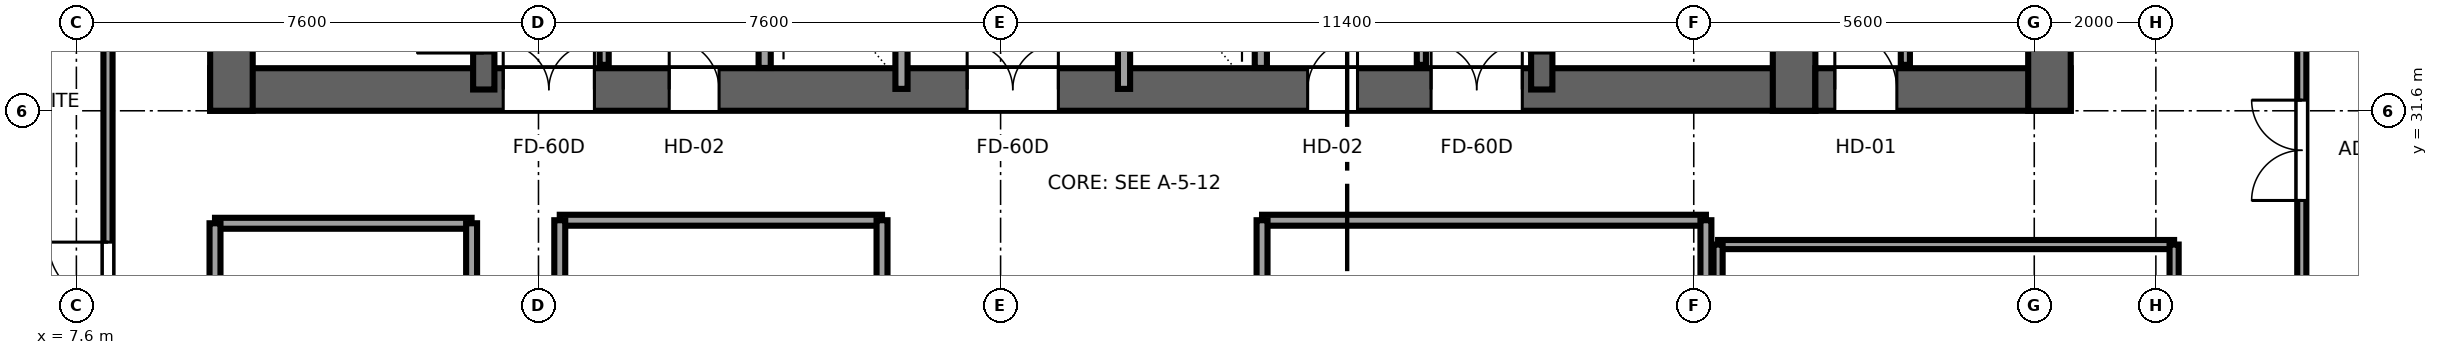
"""IFC4 building model, lengths in metres.
Left out: names, types, materials, properties, quantities, classifications, styles, units other than length and angle.
Written with IfcOpenShell. Run it as: python <this file> out.ifc"""

import sys

from ifc_helpers import new_model, si_unit, direction, frame, frame_2d, origin, place, context, subcontext, project, spatial, rectangle, extrude, source, transform, mapped, element, fill, save


model = new_model("IFC4")
c1 = context("Model", 3, precision=1e-05, world=origin(), true_north=direction((0.0, 1.0)))
c2 = subcontext(c1, "Body", "Model", "MODEL_VIEW")
j1 = project(units=[si_unit("LENGTHUNIT", "METRE"), si_unit("PLANEANGLEUNIT", "RADIAN")], contexts=[c1])
p1 = place(None, origin())
s1 = spatial("IfcSite", under=j1, at=p1, CompositionType="ELEMENT")
p2 = place(p1, origin())
s2 = spatial("IfcBuilding", under=s1, at=p2, CompositionType="ELEMENT")
p3 = place(p2, frame((0.0, 0.0, 157.7)))
s3 = spatial("IfcBuildingStorey", under=s2, at=p3, CompositionType="ELEMENT", Elevation=157.7)
p4 = place(p3, frame((9.8, 31.95, 0.0), z_axis=(0.0, 0.0, 1.0), x_axis=(1.0, 0.0, 0.0)))
e1 = element("IfcWall", 1, at=p4, inside=s3, PredefinedType="SHEAR", context=c2, shape_type="SweptSolid", body=[
    extrude(rectangle(XDim=26.4, YDim=0.7, at=frame_2d((13.2, 0.0))), origin(), (0.0, 0.0, 1.0), 3.55),
])
p5 = place(p4, frame((6.32, 0.0, 0.0), z_axis=(0.0, 0.0, 1.0), x_axis=(-1.0, 0.0, 0.0)))
e2 = element("IfcOpeningElement", 2, at=p5, cuts=e1, PredefinedType="OPENING", context=c2, shape_type="SweptSolid", body=[
    extrude(rectangle(XDim=1.5, YDim=2.04, at=frame_2d((0.75, 1.02))), frame((0.0, 0.36, 0.0), z_axis=(0.0, -1.0, 0.0), x_axis=(1.0, 0.0, 0.0)), (0.0, 0.0, 1.0), 0.72),
])
p6 = place(p4, frame((13.95, 0.0, 0.0), z_axis=(0.0, 0.0, 1.0), x_axis=(-1.0, 0.0, 0.0)))
e3 = element("IfcOpeningElement", 3, at=p6, cuts=e1, PredefinedType="OPENING", context=c2, shape_type="SweptSolid", body=[
    extrude(rectangle(XDim=1.5, YDim=2.04, at=frame_2d((0.75, 1.02))), frame((0.0, 0.36, 0.0), z_axis=(0.0, -1.0, 0.0), x_axis=(1.0, 0.0, 0.0)), (0.0, 0.0, 1.0), 0.72),
])
p7 = place(p4, frame((21.58, 0.0, 0.0), z_axis=(0.0, 0.0, 1.0), x_axis=(-1.0, 0.0, 0.0)))
e4 = element("IfcOpeningElement", 4, at=p7, cuts=e1, PredefinedType="OPENING", context=c2, shape_type="SweptSolid", body=[
    extrude(rectangle(XDim=1.5, YDim=2.04, at=frame_2d((0.75, 1.02))), frame((0.0, 0.36, 0.0), z_axis=(0.0, -1.0, 0.0), x_axis=(1.0, 0.0, 0.0)), (0.0, 0.0, 1.0), 0.72),
])
p8 = place(p4, frame((8.37, 0.0, 0.0), z_axis=(0.0, 0.0, 1.0), x_axis=(-1.0, 0.0, 0.0)))
e5 = element("IfcOpeningElement", 5, at=p8, cuts=e1, PredefinedType="OPENING", context=c2, shape_type="SweptSolid", body=[
    extrude(rectangle(XDim=0.82, YDim=2.01, at=frame_2d((0.41, 1.005))), frame((0.0, 0.36, 0.0), z_axis=(0.0, -1.0, 0.0), x_axis=(1.0, 0.0, 0.0)), (0.0, 0.0, 1.0), 0.72),
])
p9 = place(p4, frame((18.87, 0.0, 0.0), z_axis=(0.0, 0.0, 1.0), x_axis=(-1.0, 0.0, 0.0)))
e6 = element("IfcOpeningElement", 6, at=p9, cuts=e1, PredefinedType="OPENING", context=c2, shape_type="SweptSolid", body=[
    extrude(rectangle(XDim=0.82, YDim=2.01, at=frame_2d((0.41, 1.005))), frame((0.0, 0.36, 0.0), z_axis=(0.0, -1.0, 0.0), x_axis=(1.0, 0.0, 0.0)), (0.0, 0.0, 1.0), 0.72),
])
for number, where, z_axis, x_axis in (
    (7, (10.15, 31.6, 0.0), (0.0, 0.0, 1.0), (0.0, 1.0, 0.0)),
    (8, (35.85, 31.6, 0.0), (0.0, 0.0, 1.0), (0.0, 1.0, 0.0)),
):
    element("IfcWall", number, at=place(p3, frame(where, z_axis=z_axis, x_axis=x_axis)), inside=s3, PredefinedType="SHEAR", context=c2, shape_type="SweptSolid", body=[
        extrude(rectangle(XDim=13.6, YDim=0.7, at=frame_2d((6.8, 0.0))), origin(), (0.0, 0.0, 1.0), 3.55),
    ])
p10 = place(p3, frame((14.3, 31.95, 0.0), z_axis=(0.0, 0.0, 1.0), x_axis=(0.0, 1.0, 0.0)))
e9 = element("IfcWall", 9, at=p10, inside=s3, PredefinedType="SHEAR", context=c2, shape_type="SweptSolid", body=[
    extrude(rectangle(XDim=12.9, YDim=0.35, at=frame_2d((6.45, 0.0))), origin(), (0.0, 0.0, 1.0), 3.55),
])
p11 = place(p10, frame((0.6, 0.0, 0.0)))
e10 = element("IfcOpeningElement", 10, at=p11, cuts=e9, PredefinedType="OPENING", context=c2, shape_type="SweptSolid", body=[
    extrude(rectangle(XDim=1.1, YDim=2.12, at=frame_2d((0.55, 1.06))), frame((0.0, 0.185, 0.0), z_axis=(0.0, -1.0, 0.0), x_axis=(1.0, 0.0, 0.0)), (0.0, 0.0, 1.0), 0.37),
])
p12 = place(p3, frame((31.7, 31.95, 0.0), z_axis=(0.0, 0.0, 1.0), x_axis=(0.0, 1.0, 0.0)))
e11 = element("IfcWall", 11, at=p12, inside=s3, PredefinedType="SHEAR", context=c2, shape_type="SweptSolid", body=[
    extrude(rectangle(XDim=12.9, YDim=0.35, at=frame_2d((6.45, 0.0))), origin(), (0.0, 0.0, 1.0), 3.55),
])
p13 = place(p12, frame((1.7, 0.0, 0.0), z_axis=(0.0, 0.0, 1.0), x_axis=(-1.0, 0.0, 0.0)))
e12 = element("IfcOpeningElement", 12, at=p13, cuts=e11, PredefinedType="OPENING", context=c2, shape_type="SweptSolid", body=[
    extrude(rectangle(XDim=1.1, YDim=2.12, at=frame_2d((0.55, 1.06))), frame((0.0, 0.185, 0.0), z_axis=(0.0, -1.0, 0.0), x_axis=(1.0, 0.0, 0.0)), (0.0, 0.0, 1.0), 0.37),
])
p14 = place(p3, frame((36.2, 31.95, 0.0), z_axis=(0.0, 0.0, 1.0), x_axis=(1.0, 0.0, 0.0)))
e13 = element("IfcWall", 13, at=p14, inside=s3, PredefinedType="SHEAR", context=c2, shape_type="SweptSolid", body=[
    extrude(rectangle(XDim=4.2, YDim=0.7, at=frame_2d((2.1, 0.0))), origin(), (0.0, 0.0, 1.0), 3.55),
])
p15 = place(p14, frame((1.34, 0.0, 0.0), z_axis=(0.0, 0.0, 1.0), x_axis=(-1.0, 0.0, 0.0)))
e14 = element("IfcOpeningElement", 14, at=p15, cuts=e13, PredefinedType="OPENING", context=c2, shape_type="SweptSolid", body=[
    extrude(rectangle(XDim=1.02, YDim=2.03, at=frame_2d((0.51, 1.015))), frame((0.0, 0.36, 0.0), z_axis=(0.0, -1.0, 0.0), x_axis=(1.0, 0.0, 0.0)), (0.0, 0.0, 1.0), 0.72),
])
p16 = place(p3, frame((40.05, 31.6, 0.0), z_axis=(0.0, 0.0, 1.0), x_axis=(0.0, 1.0, 0.0)))
e15 = element("IfcWall", 15, at=p16, inside=s3, PredefinedType="SHEAR", context=c2, shape_type="SweptSolid", body=[
    extrude(rectangle(XDim=13.6, YDim=0.7, at=frame_2d((6.8, 0.0))), origin(), (0.0, 0.0, 1.0), 3.55),
])
for number, where, z_axis, x_axis in (
    (16, (18.92, 32.304, 0.0), (0.0, 0.0, 1.0), (0.0, 1.0, 0.0)),
    (17, (27.08, 32.304, 0.0), (0.0, 0.0, 1.0), (0.0, 1.0, 0.0)),
):
    element("IfcWall", number, at=place(p3, frame(where, z_axis=z_axis, x_axis=x_axis)), inside=s3, PredefinedType="SOLIDWALL", context=c2, shape_type="SweptSolid", body=[
        extrude(rectangle(XDim=3.846, YDim=0.2, at=frame_2d((1.923, 0.0))), origin(), (0.0, 0.0, 1.0), 3.37),
    ])
p17 = place(p3, frame((21.17, 31.96, 0.0), z_axis=(0.0, 0.0, 1.0), x_axis=(0.0, 1.0, 0.0)))
e18 = element("IfcWall", 18, at=p17, inside=s3, PredefinedType="SOLIDWALL", context=c2, shape_type="SweptSolid", body=[
    extrude(rectangle(XDim=12.58, YDim=0.2, at=frame_2d((6.29, 0.0))), origin(), (0.0, 0.0, 1.0), 3.37),
])
p18 = place(p17, frame((5.74, 0.0, 0.0)))
e19 = element("IfcOpeningElement", 19, at=p18, cuts=e18, PredefinedType="OPENING", context=c2, shape_type="SweptSolid", body=[
    extrude(rectangle(XDim=1.1, YDim=2.12, at=frame_2d((0.55, 1.06))), frame((0.0, 0.11, 0.0), z_axis=(0.0, -1.0, 0.0), x_axis=(1.0, 0.0, 0.0)), (0.0, 0.0, 1.0), 0.22),
])
p19 = place(p17, frame((8.24, 0.0, 0.0)))
e20 = element("IfcOpeningElement", 20, at=p19, cuts=e18, PredefinedType="OPENING", context=c2, shape_type="SweptSolid", body=[
    extrude(rectangle(XDim=1.1, YDim=2.12, at=frame_2d((0.55, 1.06))), frame((0.0, 0.11, 0.0), z_axis=(0.0, -1.0, 0.0), x_axis=(1.0, 0.0, 0.0)), (0.0, 0.0, 1.0), 0.22),
])
p20 = place(p3, frame((24.83, 31.96, 0.0), z_axis=(0.0, 0.0, 1.0), x_axis=(0.0, 1.0, 0.0)))
e21 = element("IfcWall", 21, at=p20, inside=s3, PredefinedType="SOLIDWALL", context=c2, shape_type="SweptSolid", body=[
    extrude(rectangle(XDim=12.58, YDim=0.2, at=frame_2d((6.29, 0.0))), origin(), (0.0, 0.0, 1.0), 3.37),
])
p21 = place(p20, frame((5.74, 0.0, 0.0)))
e22 = element("IfcOpeningElement", 22, at=p21, cuts=e21, PredefinedType="OPENING", context=c2, shape_type="SweptSolid", body=[
    extrude(rectangle(XDim=1.1, YDim=2.12, at=frame_2d((0.55, 1.06))), frame((0.0, 0.11, 0.0), z_axis=(0.0, -1.0, 0.0), x_axis=(1.0, 0.0, 0.0)), (0.0, 0.0, 1.0), 0.22),
])
p22 = place(p20, frame((8.24, 0.0, 0.0)))
e23 = element("IfcOpeningElement", 23, at=p22, cuts=e21, PredefinedType="OPENING", context=c2, shape_type="SweptSolid", body=[
    extrude(rectangle(XDim=1.1, YDim=2.12, at=frame_2d((0.55, 1.06))), frame((0.0, 0.11, 0.0), z_axis=(0.0, -1.0, 0.0), x_axis=(1.0, 0.0, 0.0)), (0.0, 0.0, 1.0), 0.22),
])
for number, where, z_axis, x_axis in (
    (24, (16.28, 32.355, 0.0), (0.0, 0.0, 1.0), (0.0, 1.0, 0.0)),
    (25, (29.72, 32.355, 0.0), (0.0, 0.0, 1.0), (0.0, 1.0, 0.0)),
):
    element("IfcWall", number, at=place(p3, frame(where, z_axis=z_axis, x_axis=x_axis)), inside=s3, PredefinedType="PARTITIONING", context=c2, shape_type="SweptSolid", body=[
        extrude(rectangle(XDim=0.865, YDim=0.15, at=frame_2d((0.433, 0.0))), origin(), (0.0, 0.0, 1.0), 3.37),
    ])
p23 = place(p3, frame((37.68, 32.355, 0.0), z_axis=(0.0, 0.0, 1.0), x_axis=(0.0, 1.0, 0.0)))
e26 = element("IfcWall", 26, at=p23, inside=s3, PredefinedType="PARTITIONING", context=c2, shape_type="SweptSolid", body=[
    extrude(rectangle(XDim=7.845, YDim=0.15, at=frame_2d((3.922, 0.0))), origin(), (0.0, 0.0, 1.0), 3.37),
])
p24 = place(p23, frame((3.413, 0.0, 0.0)))
e27 = element("IfcOpeningElement", 27, at=p24, cuts=e26, PredefinedType="OPENING", context=c2, shape_type="SweptSolid", body=[
    extrude(rectangle(XDim=1.02, YDim=2.03, at=frame_2d((0.51, 1.015))), frame((0.0, 0.085, 0.0), z_axis=(0.0, -1.0, 0.0), x_axis=(1.0, 0.0, 0.0)), (0.0, 0.0, 1.0), 0.17),
])
p25 = place(p3, frame((8.12, 23.58, 0.0), z_axis=(0.0, 0.0, 1.0), x_axis=(0.0, 1.0, 0.0)))
e28 = element("IfcWall", 28, at=p25, inside=s3, PredefinedType="PARTITIONING", context=c2, shape_type="SweptSolid", body=[
    extrude(rectangle(XDim=10.74, YDim=0.15, at=frame_2d((5.37, 0.0))), origin(), (0.0, 0.0, 1.0), 3.37),
])
p26 = place(p25, frame((4.88, 0.0, 0.0)))
e29 = element("IfcOpeningElement", 29, at=p26, cuts=e28, PredefinedType="OPENING", context=c2, shape_type="SweptSolid", body=[
    extrude(rectangle(XDim=0.98, YDim=2.12, at=frame_2d((0.49, 1.06))), frame((0.0, 0.085, 0.0), z_axis=(0.0, -1.0, 0.0), x_axis=(1.0, 0.0, 0.0)), (0.0, 0.0, 1.0), 0.17),
])
p27 = place(p3, frame((44.2, 27.3, 0.0), z_axis=(0.0, 0.0, 1.0), x_axis=(0.0, 1.0, 0.0)))
e30 = element("IfcWall", 30, at=p27, inside=s3, PredefinedType="PARTITIONING", context=c2, shape_type="SweptSolid", body=[
    extrude(rectangle(XDim=7.3, YDim=0.15, at=frame_2d((3.65, 0.0))), origin(), (0.0, 0.0, 1.0), 3.37),
])
p28 = place(p27, frame((2.825, 0.0, 0.0)))
e31 = element("IfcOpeningElement", 31, at=p28, cuts=e30, PredefinedType="OPENING", context=c2, shape_type="SweptSolid", body=[
    extrude(rectangle(XDim=1.65, YDim=2.15, at=frame_2d((0.825, 1.075))), frame((0.0, 0.085, 0.0), z_axis=(0.0, -1.0, 0.0), x_axis=(1.0, 0.0, 0.0)), (0.0, 0.0, 1.0), 0.17),
])
p29 = place(p3, frame((9.88, 29.75, 0.0), z_axis=(0.0, 0.0, 1.0), x_axis=(1.0, 0.0, 0.0)))
e32 = element("IfcWall", 32, at=p29, inside=s3, PredefinedType="PARTITIONING", context=c2, shape_type="SweptSolid", body=[
    extrude(rectangle(XDim=4.22, YDim=0.18, at=frame_2d((2.11, 0.0))), origin(), (0.0, 0.0, 1.0), 3.37),
])
for number, where, z_axis, x_axis in (
    (33, (9.88, 23.5, 0.0), (0.0, 0.0, 1.0), (0.0, 1.0, 0.0)),
    (34, (14.1, 23.5, 0.0), (0.0, 0.0, 1.0), (0.0, 1.0, 0.0)),
):
    element("IfcWall", number, at=place(p3, frame(where, z_axis=z_axis, x_axis=x_axis)), inside=s3, PredefinedType="PARTITIONING", context=c2, shape_type="SweptSolid", body=[
        extrude(rectangle(XDim=6.25, YDim=0.18, at=frame_2d((3.125, 0.0))), origin(), (0.0, 0.0, 1.0), 3.37),
    ])
p30 = place(p3, frame((27.1, 29.8, 0.0), z_axis=(0.0, 0.0, 1.0), x_axis=(1.0, 0.0, 0.0)))
e35 = element("IfcWall", 35, at=p30, inside=s3, PredefinedType="PARTITIONING", context=c2, shape_type="SweptSolid", body=[
    extrude(rectangle(XDim=7.3, YDim=0.18, at=frame_2d((3.65, 0.0))), origin(), (0.0, 0.0, 1.0), 3.37),
])
for number, where, z_axis, x_axis in (
    (36, (27.1, 23.5, 0.0), (0.0, 0.0, 1.0), (0.0, 1.0, 0.0)),
    (37, (34.4, 23.5, 0.0), (0.0, 0.0, 1.0), (0.0, 1.0, 0.0)),
):
    element("IfcWall", number, at=place(p3, frame(where, z_axis=z_axis, x_axis=x_axis)), inside=s3, PredefinedType="PARTITIONING", context=c2, shape_type="SweptSolid", body=[
        extrude(rectangle(XDim=6.3, YDim=0.18, at=frame_2d((3.15, 0.0))), origin(), (0.0, 0.0, 1.0), 3.37),
    ])
p31 = place(p3, frame((15.55, 29.8, 0.0), z_axis=(0.0, 0.0, 1.0), x_axis=(1.0, 0.0, 0.0)))
e38 = element("IfcWall", 38, at=p31, inside=s3, PredefinedType="PARTITIONING", context=c2, shape_type="SweptSolid", body=[
    extrude(rectangle(XDim=5.3, YDim=0.18, at=frame_2d((2.65, 0.0))), origin(), (0.0, 0.0, 1.0), 3.37),
])
for number, where, z_axis, x_axis in (
    (39, (15.55, 23.5, 0.0), (0.0, 0.0, 1.0), (0.0, 1.0, 0.0)),
    (40, (20.85, 23.5, 0.0), (0.0, 0.0, 1.0), (0.0, 1.0, 0.0)),
):
    element("IfcWall", number, at=place(p3, frame(where, z_axis=z_axis, x_axis=x_axis)), inside=s3, PredefinedType="PARTITIONING", context=c2, shape_type="SweptSolid", body=[
        extrude(rectangle(XDim=6.3, YDim=0.18, at=frame_2d((3.15, 0.0))), origin(), (0.0, 0.0, 1.0), 3.37),
    ])
p32 = place(p3, frame((34.6, 29.4, 0.0), z_axis=(0.0, 0.0, 1.0), x_axis=(1.0, 0.0, 0.0)))
e41 = element("IfcWall", 41, at=p32, inside=s3, PredefinedType="PARTITIONING", context=c2, shape_type="SweptSolid", body=[
    extrude(rectangle(XDim=7.5, YDim=0.15, at=frame_2d((3.75, 0.0))), origin(), (0.0, 0.0, 1.0), 3.37),
])
p33 = place(p3, frame((34.6, 23.5, 0.0), z_axis=(0.0, 0.0, 1.0), x_axis=(0.0, 1.0, 0.0)))
e42 = element("IfcWall", 42, at=p33, inside=s3, PredefinedType="PARTITIONING", context=c2, shape_type="SweptSolid", body=[
    extrude(rectangle(XDim=5.9, YDim=0.15, at=frame_2d((2.95, 0.0))), origin(), (0.0, 0.0, 1.0), 3.37),
])
p34 = place(p3, frame((42.1, 23.5, 0.0), z_axis=(0.0, 0.0, 1.0), x_axis=(0.0, 1.0, 0.0)))
e43 = element("IfcWall", 43, at=p34, inside=s3, PredefinedType="PARTITIONING", context=c2, shape_type="SweptSolid", body=[
    extrude(rectangle(XDim=5.9, YDim=0.15, at=frame_2d((2.95, 0.0))), origin(), (0.0, 0.0, 1.0), 2.16),
])
m1 = source(origin(), c2, "Body", "SweptSolid", [
    extrude(rectangle(XDim=1.1, YDim=2.12, at=frame_2d((0.55, 1.06))), frame((0.0, 0.025, 0.0), z_axis=(0.0, -1.0, 0.0), x_axis=(1.0, 0.0, 0.0)), (0.0, 0.0, 1.0), 0.05),
])
p35 = place(p11, origin())
e44 = element("IfcDoor", 44, at=p35, inside=s3, OperationType="SINGLE_SWING_LEFT", PredefinedType="DOOR", context=c2, shape_type="MappedRepresentation", body=[
    mapped(m1, transform((0.0, 0.0, 0.0), x_axis=(1.0, 0.0, 0.0), y_axis=(0.0, 1.0, 0.0), z_axis=(0.0, 0.0, 1.0), scale=1.0)),
])
fill(e10, e44)
p36 = place(p13, origin())
e45 = element("IfcDoor", 45, at=p36, inside=s3, OperationType="SINGLE_SWING_RIGHT", PredefinedType="DOOR", context=c2, shape_type="MappedRepresentation", body=[
    mapped(m1, transform((0.0, 0.0, 0.0), x_axis=(1.0, 0.0, 0.0), y_axis=(0.0, 1.0, 0.0), z_axis=(0.0, 0.0, 1.0), scale=1.0)),
])
fill(e12, e45)
m2 = source(origin(), c2, "Body", "SweptSolid", [
    extrude(rectangle(XDim=1.5, YDim=2.04, at=frame_2d((0.75, 1.02))), frame((0.0, 0.025, 0.0), z_axis=(0.0, -1.0, 0.0), x_axis=(1.0, 0.0, 0.0)), (0.0, 0.0, 1.0), 0.05),
])
p37 = place(p5, origin())
e46 = element("IfcDoor", 46, at=p37, inside=s3, OperationType="DOUBLE_DOOR_SINGLE_SWING", PredefinedType="DOOR", context=c2, shape_type="MappedRepresentation", body=[
    mapped(m2, transform((0.0, 0.0, 0.0), x_axis=(1.0, 0.0, 0.0), y_axis=(0.0, 1.0, 0.0), z_axis=(0.0, 0.0, 1.0), scale=1.0)),
])
fill(e2, e46)
p38 = place(p6, origin())
e47 = element("IfcDoor", 47, at=p38, inside=s3, OperationType="DOUBLE_DOOR_SINGLE_SWING", PredefinedType="DOOR", context=c2, shape_type="MappedRepresentation", body=[
    mapped(m2, transform((0.0, 0.0, 0.0), x_axis=(1.0, 0.0, 0.0), y_axis=(0.0, 1.0, 0.0), z_axis=(0.0, 0.0, 1.0), scale=1.0)),
])
fill(e3, e47)
p39 = place(p7, origin())
e48 = element("IfcDoor", 48, at=p39, inside=s3, OperationType="DOUBLE_DOOR_SINGLE_SWING", PredefinedType="DOOR", context=c2, shape_type="MappedRepresentation", body=[
    mapped(m2, transform((0.0, 0.0, 0.0), x_axis=(1.0, 0.0, 0.0), y_axis=(0.0, 1.0, 0.0), z_axis=(0.0, 0.0, 1.0), scale=1.0)),
])
fill(e4, e48)
m3 = source(origin(), c2, "Body", "SweptSolid", [
    extrude(rectangle(XDim=0.82, YDim=2.01, at=frame_2d((0.41, 1.005))), frame((0.0, 0.025, 0.0), z_axis=(0.0, -1.0, 0.0), x_axis=(1.0, 0.0, 0.0)), (0.0, 0.0, 1.0), 0.05),
])
p40 = place(p8, origin())
e49 = element("IfcDoor", 49, at=p40, inside=s3, OperationType="SINGLE_SWING_LEFT", PredefinedType="DOOR", context=c2, shape_type="MappedRepresentation", body=[
    mapped(m3, transform((0.0, 0.0, 0.0), x_axis=(1.0, 0.0, 0.0), y_axis=(0.0, 1.0, 0.0), z_axis=(0.0, 0.0, 1.0), scale=1.0)),
])
fill(e5, e49)
p41 = place(p9, origin())
e50 = element("IfcDoor", 50, at=p41, inside=s3, OperationType="SINGLE_SWING_RIGHT", PredefinedType="DOOR", context=c2, shape_type="MappedRepresentation", body=[
    mapped(m3, transform((0.0, 0.0, 0.0), x_axis=(1.0, 0.0, 0.0), y_axis=(0.0, 1.0, 0.0), z_axis=(0.0, 0.0, 1.0), scale=1.0)),
])
fill(e6, e50)
m4 = source(origin(), c2, "Body", "SweptSolid", [
    extrude(rectangle(XDim=1.02, YDim=2.03, at=frame_2d((0.51, 1.015))), frame((0.0, 0.025, 0.0), z_axis=(0.0, -1.0, 0.0), x_axis=(1.0, 0.0, 0.0)), (0.0, 0.0, 1.0), 0.05),
])
p42 = place(p15, origin())
e51 = element("IfcDoor", 51, at=p42, inside=s3, OperationType="SINGLE_SWING_LEFT", PredefinedType="DOOR", context=c2, shape_type="MappedRepresentation", body=[
    mapped(m4, transform((0.0, 0.0, 0.0), x_axis=(1.0, 0.0, 0.0), y_axis=(0.0, 1.0, 0.0), z_axis=(0.0, 0.0, 1.0), scale=1.0)),
])
fill(e14, e51)
m5 = source(origin(), c2, "Body", "SweptSolid", [
    extrude(rectangle(XDim=0.98, YDim=2.12, at=frame_2d((0.49, 1.06))), frame((0.0, 0.025, 0.0), z_axis=(0.0, -1.0, 0.0), x_axis=(1.0, 0.0, 0.0)), (0.0, 0.0, 1.0), 0.05),
])
p43 = place(p26, origin())
e52 = element("IfcDoor", 52, at=p43, inside=s3, OperationType="SINGLE_SWING_RIGHT", PredefinedType="DOOR", context=c2, shape_type="MappedRepresentation", body=[
    mapped(m5, transform((0.0, 0.0, 0.0), x_axis=(1.0, 0.0, 0.0), y_axis=(0.0, 1.0, 0.0), z_axis=(0.0, 0.0, 1.0), scale=1.0)),
])
fill(e29, e52)
m6 = source(origin(), c2, "Body", "SweptSolid", [
    extrude(rectangle(XDim=1.65, YDim=2.15, at=frame_2d((0.825, 1.075))), frame((0.0, 0.025, 0.0), z_axis=(0.0, -1.0, 0.0), x_axis=(1.0, 0.0, 0.0)), (0.0, 0.0, 1.0), 0.05),
])
p44 = place(p28, origin())
e53 = element("IfcDoor", 53, at=p44, inside=s3, OperationType="DOUBLE_DOOR_SINGLE_SWING", PredefinedType="DOOR", context=c2, shape_type="MappedRepresentation", body=[
    mapped(m6, transform((0.0, 0.0, 0.0), x_axis=(1.0, 0.0, 0.0), y_axis=(0.0, 1.0, 0.0), z_axis=(0.0, 0.0, 1.0), scale=1.0)),
])
fill(e31, e53)
save(model, sys.argv[1])
